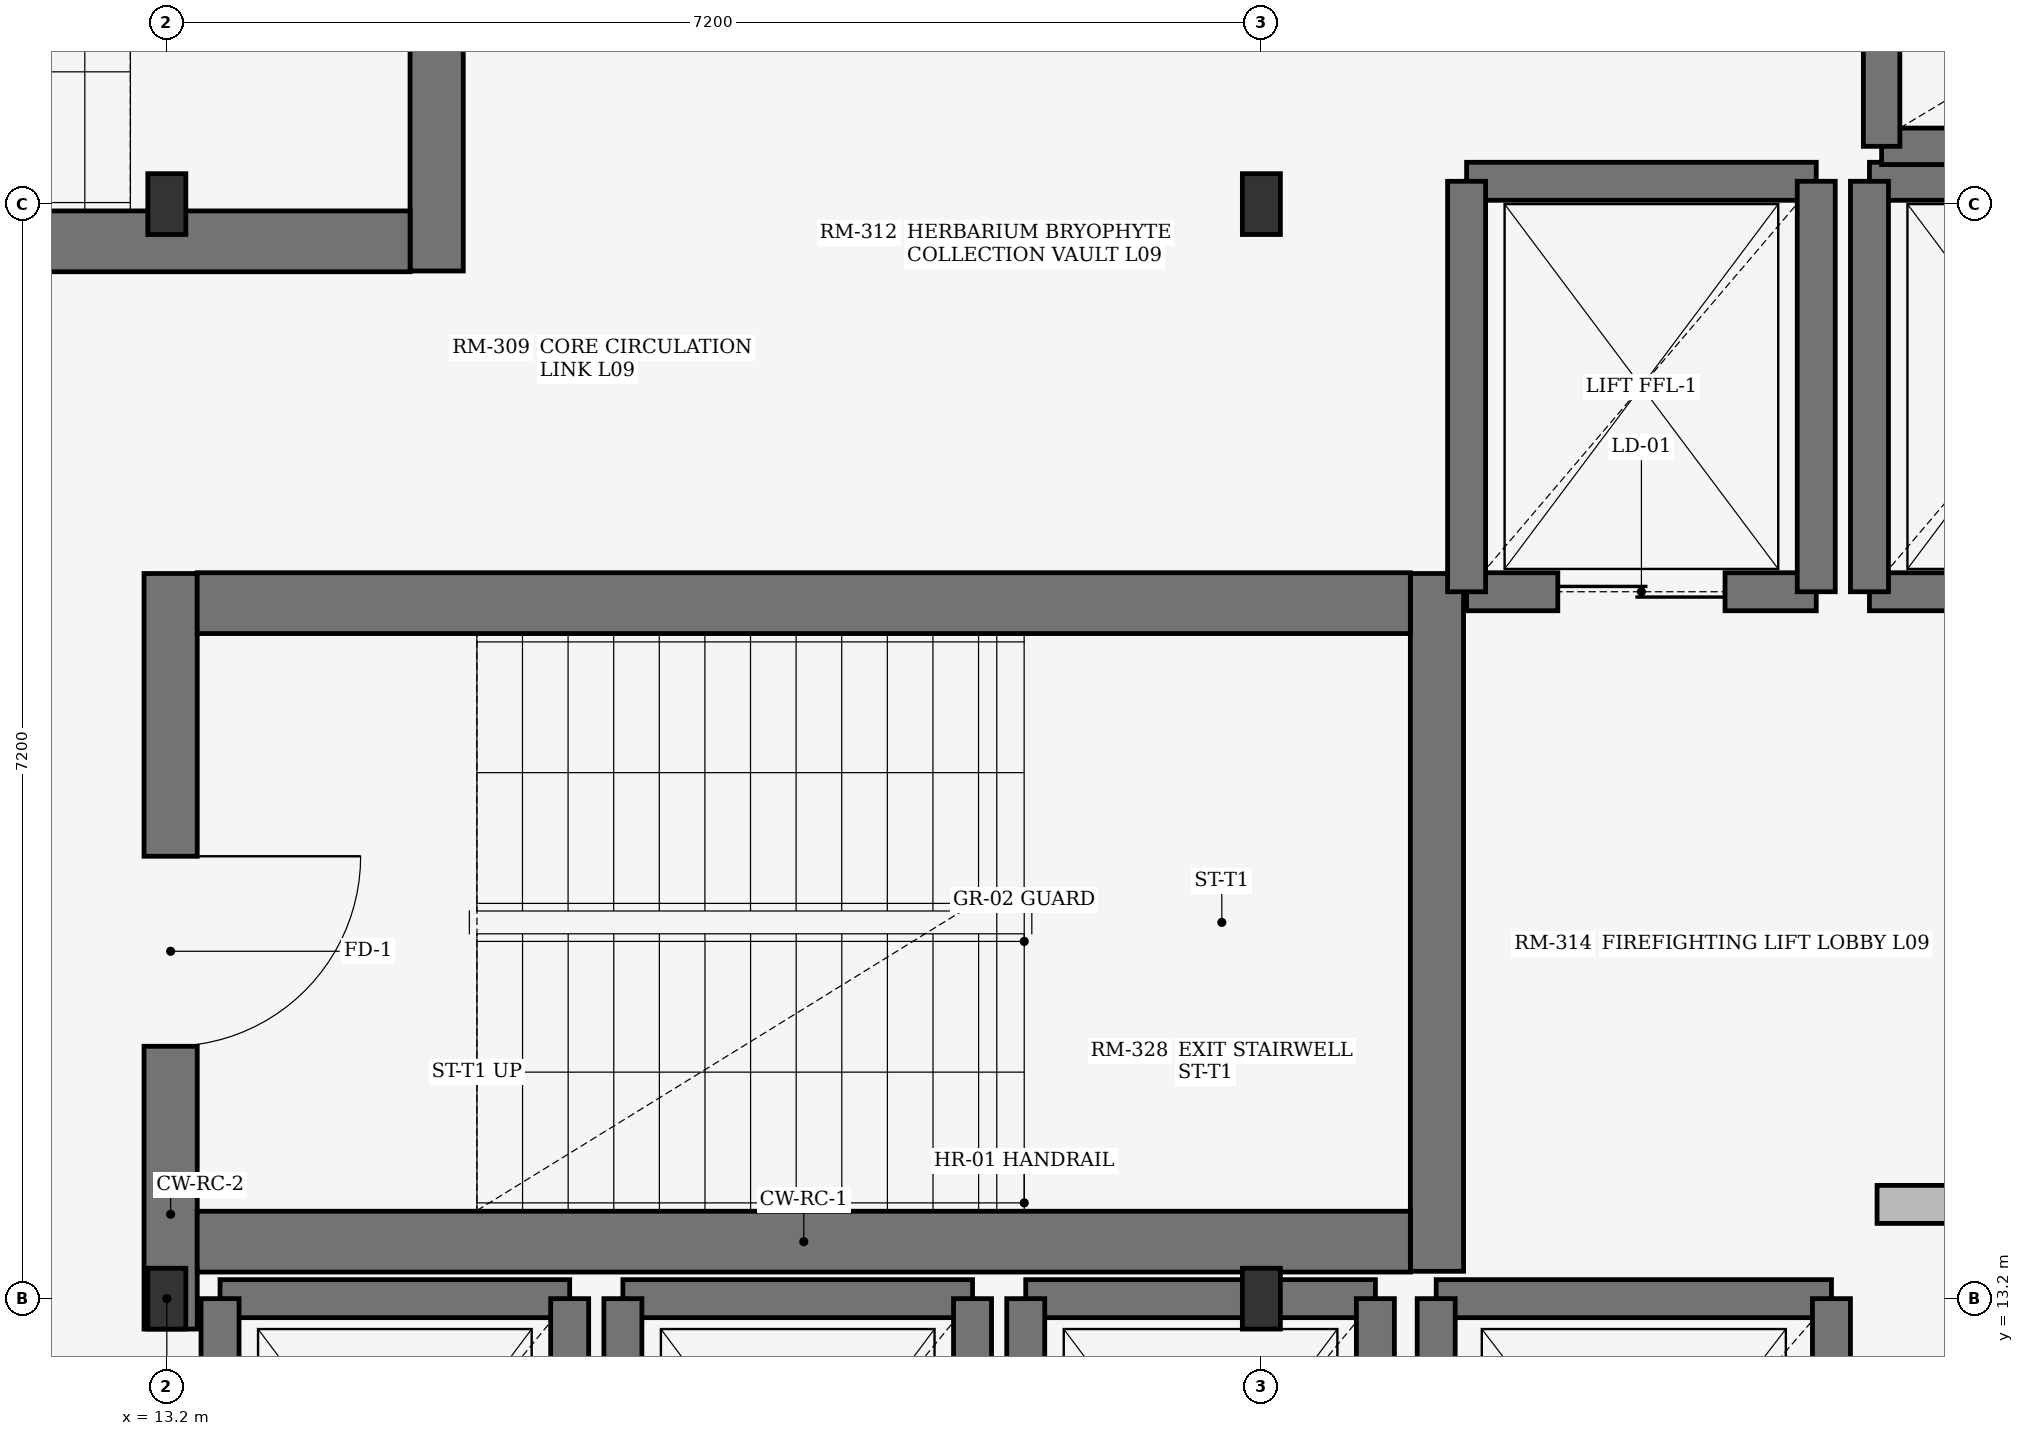
"""IFC4 building model, lengths in metres.
Left out: names, types, materials, properties, quantities, classifications, styles, units other than length and angle.
Written with IfcOpenShell. Run it as: python <this file> out.ifc"""

import sys

from ifc_helpers import new_model, si_unit, direction, frame, frame_2d, origin, origin_2d, place, context, subcontext, project, spatial, rectangle, i_section, extrude, element, fill, save


model = new_model("IFC4")
c1 = context("Model", 3, precision=1e-05, world=origin(), true_north=direction((0.0, 1.0)))
c2 = subcontext(c1, "Body", "Model", "MODEL_VIEW")
j1 = project(units=[si_unit("LENGTHUNIT", "METRE"), si_unit("PLANEANGLEUNIT", "RADIAN")], contexts=[c1])
p1 = place(None, origin())
s1 = spatial("IfcSite", under=j1, at=p1, CompositionType="ELEMENT")
p2 = place(p1, origin())
s2 = spatial("IfcBuilding", under=s1, at=p2, CompositionType="ELEMENT")
p3 = place(p2, frame((0.0, 0.0, 36.6)))
s3 = spatial("IfcBuildingStorey", under=s2, at=p3, CompositionType="ELEMENT", Elevation=36.6)
for number, where, z_axis, x_axis in (
    (1, (13.2, 13.2, 0.0), (0.0, 0.0, 1.0), (1.0, 0.0, 0.0)),
    (2, (13.2, 20.4, 0.0), (0.0, 0.0, 1.0), (1.0, 0.0, 0.0)),
    (3, (20.4, 13.2, 0.0), (0.0, 0.0, 1.0), (1.0, 0.0, 0.0)),
    (4, (20.4, 20.4, 0.0), (0.0, 0.0, 1.0), (1.0, 0.0, 0.0)),
):
    element("IfcColumn", number, at=place(p3, frame(where, z_axis=z_axis, x_axis=x_axis)), inside=s3, PredefinedType="COLUMN", context=c2, shape_type="SweptSolid", body=[
        extrude(i_section(OverallWidth=0.25, OverallDepth=0.4, WebThickness=0.01, FlangeThickness=0.013, at=origin_2d()), origin(), (0.0, 0.0, 1.0), 3.62),
    ])
p4 = place(p3, frame((13.225, 13.0, 0.0), z_axis=(0.0, 0.0, 1.0), x_axis=(0.0, 1.0, 0.0)))
e5 = element("IfcWall", 5, at=p4, inside=s3, PredefinedType="SHEAR", context=c2, shape_type="SweptSolid", body=[
    extrude(rectangle(XDim=4.97, YDim=0.35, at=frame_2d((2.485, 0.0))), origin(), (0.0, 0.0, 1.0), 3.62),
])
p5 = place(p4, frame((1.86, 0.0, 0.0)))
e6 = element("IfcOpeningElement", 6, at=p5, cuts=e5, PredefinedType="OPENING", context=c2, shape_type="SweptSolid", body=[
    extrude(rectangle(XDim=1.25, YDim=2.2, at=frame_2d((0.625, 1.1))), frame((0.0, 0.185, 0.0), z_axis=(0.0, -1.0, 0.0), x_axis=(1.0, 0.0, 0.0)), (0.0, 0.0, 1.0), 0.37),
])
p6 = place(p3, frame((21.555, 13.38, 0.0), z_axis=(0.0, 0.0, 1.0), x_axis=(0.0, 1.0, 0.0)))
e7 = element("IfcWall", 7, at=p6, inside=s3, PredefinedType="SHEAR", context=c2, shape_type="SweptSolid", body=[
    extrude(rectangle(XDim=4.59, YDim=0.35, at=frame_2d((2.295, 0.0))), origin(), (0.0, 0.0, 1.0), 3.62),
])
for number, where, z_axis, x_axis in (
    (8, (13.4, 13.575, 0.0), (0.0, 0.0, 1.0), (1.0, 0.0, 0.0)),
    (9, (13.4, 17.775, 0.0), (0.0, 0.0, 1.0), (1.0, 0.0, 0.0)),
):
    element("IfcWall", number, at=place(p3, frame(where, z_axis=z_axis, x_axis=x_axis)), inside=s3, PredefinedType="SHEAR", context=c2, shape_type="SweptSolid", body=[
        extrude(rectangle(XDim=7.98, YDim=0.4, at=frame_2d((3.99, 0.0))), origin(), (0.0, 0.0, 1.0), 3.62),
    ])
p7 = place(p3, frame((14.975, 24.55, 0.0), z_axis=(0.0, 0.0, 1.0), x_axis=(0.0, -1.0, 0.0)))
e10 = element("IfcWall", 10, at=p7, inside=s3, PredefinedType="SHEAR", context=c2, shape_type="SweptSolid", body=[
    extrude(rectangle(XDim=4.59, YDim=0.35, at=frame_2d((2.295, 0.0))), origin(), (0.0, 0.0, 1.0), 3.62),
])
p8 = place(p7, frame((1.72, 0.0, 0.0)))
e11 = element("IfcOpeningElement", 11, at=p8, cuts=e10, PredefinedType="OPENING", context=c2, shape_type="SweptSolid", body=[
    extrude(rectangle(XDim=1.15, YDim=2.2, at=frame_2d((0.575, 1.1))), frame((0.0, 0.185, 0.0), z_axis=(0.0, -1.0, 0.0), x_axis=(1.0, 0.0, 0.0)), (0.0, 0.0, 1.0), 0.37),
])
p9 = place(p3, frame((14.8, 20.155, 0.0), z_axis=(0.0, 0.0, 1.0), x_axis=(-1.0, 0.0, 0.0)))
e12 = element("IfcWall", 12, at=p9, inside=s3, PredefinedType="SHEAR", context=c2, shape_type="SweptSolid", body=[
    extrude(rectangle(XDim=7.98, YDim=0.4, at=frame_2d((3.99, 0.0))), origin(), (0.0, 0.0, 1.0), 3.62),
])
p10 = place(p3, frame((21.75, 17.85, 0.0), z_axis=(0.0, 0.0, 1.0), x_axis=(1.0, 0.0, 0.0)))
e13 = element("IfcWall", 13, at=p10, inside=s3, PredefinedType="SHEAR", context=c2, shape_type="SweptSolid", body=[
    extrude(rectangle(XDim=2.3, YDim=0.25, at=frame_2d((1.15, 0.0))), origin(), (0.0, 0.0, 1.0), 3.62),
])
p11 = place(p10, frame((0.6, 0.0, 0.0)))
e14 = element("IfcOpeningElement", 14, at=p11, cuts=e13, PredefinedType="OPENING", context=c2, shape_type="SweptSolid", body=[
    extrude(rectangle(XDim=1.1, YDim=2.2, at=frame_2d((0.55, 1.1))), frame((0.0, 0.135, 0.0), z_axis=(0.0, -1.0, 0.0), x_axis=(1.0, 0.0, 0.0)), (0.0, 0.0, 1.0), 0.27),
])
p12 = place(p3, frame((21.75, 20.55, 0.0), z_axis=(0.0, 0.0, 1.0), x_axis=(1.0, 0.0, 0.0)))
e15 = element("IfcWall", 15, at=p12, inside=s3, PredefinedType="SHEAR", context=c2, shape_type="SweptSolid", body=[
    extrude(rectangle(XDim=2.3, YDim=0.25, at=frame_2d((1.15, 0.0))), origin(), (0.0, 0.0, 1.0), 3.62),
])
for number, where, z_axis, x_axis in (
    (16, (21.75, 17.85, 0.0), (0.0, 0.0, 1.0), (0.0, 1.0, 0.0)),
    (17, (24.05, 17.85, 0.0), (0.0, 0.0, 1.0), (0.0, 1.0, 0.0)),
):
    element("IfcWall", number, at=place(p3, frame(where, z_axis=z_axis, x_axis=x_axis)), inside=s3, PredefinedType="SHEAR", context=c2, shape_type="SweptSolid", body=[
        extrude(rectangle(XDim=2.7, YDim=0.25, at=frame_2d((1.35, 0.0))), origin(), (0.0, 0.0, 1.0), 3.62),
    ])
p13 = place(p3, frame((24.4, 17.85, 0.0), z_axis=(0.0, 0.0, 1.0), x_axis=(1.0, 0.0, 0.0)))
e18 = element("IfcWall", 18, at=p13, inside=s3, PredefinedType="SHEAR", context=c2, shape_type="SweptSolid", body=[
    extrude(rectangle(XDim=2.3, YDim=0.25, at=frame_2d((1.15, 0.0))), origin(), (0.0, 0.0, 1.0), 3.62),
])
p14 = place(p13, frame((0.6, 0.0, 0.0)))
e19 = element("IfcOpeningElement", 19, at=p14, cuts=e18, PredefinedType="OPENING", context=c2, shape_type="SweptSolid", body=[
    extrude(rectangle(XDim=1.1, YDim=2.2, at=frame_2d((0.55, 1.1))), frame((0.0, 0.135, 0.0), z_axis=(0.0, -1.0, 0.0), x_axis=(1.0, 0.0, 0.0)), (0.0, 0.0, 1.0), 0.27),
])
p15 = place(p3, frame((24.4, 20.55, 0.0), z_axis=(0.0, 0.0, 1.0), x_axis=(1.0, 0.0, 0.0)))
e20 = element("IfcWall", 20, at=p15, inside=s3, PredefinedType="SHEAR", context=c2, shape_type="SweptSolid", body=[
    extrude(rectangle(XDim=2.3, YDim=0.25, at=frame_2d((1.15, 0.0))), origin(), (0.0, 0.0, 1.0), 3.62),
])
p16 = place(p3, frame((24.4, 17.85, 0.0), z_axis=(0.0, 0.0, 1.0), x_axis=(0.0, 1.0, 0.0)))
e21 = element("IfcWall", 21, at=p16, inside=s3, PredefinedType="SHEAR", context=c2, shape_type="SweptSolid", body=[
    extrude(rectangle(XDim=2.7, YDim=0.25, at=frame_2d((1.35, 0.0))), origin(), (0.0, 0.0, 1.0), 3.62),
])
p17 = place(p3, frame((13.55, 13.2, 0.0), z_axis=(0.0, 0.0, 1.0), x_axis=(1.0, 0.0, 0.0)))
e22 = element("IfcWall", 22, at=p17, inside=s3, PredefinedType="SHEAR", context=c2, shape_type="SweptSolid", body=[
    extrude(rectangle(XDim=2.3, YDim=0.25, at=frame_2d((1.15, 0.0))), origin(), (0.0, 0.0, 1.0), 3.62),
])
for number, where, z_axis, x_axis in (
    (23, (13.55, 10.4, 0.0), (0.0, 0.0, 1.0), (0.0, 1.0, 0.0)),
    (24, (15.85, 10.4, 0.0), (0.0, 0.0, 1.0), (0.0, 1.0, 0.0)),
):
    element("IfcWall", number, at=place(p3, frame(where, z_axis=z_axis, x_axis=x_axis)), inside=s3, PredefinedType="SHEAR", context=c2, shape_type="SweptSolid", body=[
        extrude(rectangle(XDim=2.8, YDim=0.25, at=frame_2d((1.4, 0.0))), origin(), (0.0, 0.0, 1.0), 3.62),
    ])
p18 = place(p3, frame((16.2, 13.2, 0.0), z_axis=(0.0, 0.0, 1.0), x_axis=(1.0, 0.0, 0.0)))
e25 = element("IfcWall", 25, at=p18, inside=s3, PredefinedType="SHEAR", context=c2, shape_type="SweptSolid", body=[
    extrude(rectangle(XDim=2.3, YDim=0.25, at=frame_2d((1.15, 0.0))), origin(), (0.0, 0.0, 1.0), 3.62),
])
for number, where, z_axis, x_axis in (
    (26, (16.2, 10.4, 0.0), (0.0, 0.0, 1.0), (0.0, 1.0, 0.0)),
    (27, (18.5, 10.4, 0.0), (0.0, 0.0, 1.0), (0.0, 1.0, 0.0)),
):
    element("IfcWall", number, at=place(p3, frame(where, z_axis=z_axis, x_axis=x_axis)), inside=s3, PredefinedType="SHEAR", context=c2, shape_type="SweptSolid", body=[
        extrude(rectangle(XDim=2.8, YDim=0.25, at=frame_2d((1.4, 0.0))), origin(), (0.0, 0.0, 1.0), 3.62),
    ])
p19 = place(p3, frame((18.85, 13.2, 0.0), z_axis=(0.0, 0.0, 1.0), x_axis=(1.0, 0.0, 0.0)))
e28 = element("IfcWall", 28, at=p19, inside=s3, PredefinedType="SHEAR", context=c2, shape_type="SweptSolid", body=[
    extrude(rectangle(XDim=2.3, YDim=0.25, at=frame_2d((1.15, 0.0))), origin(), (0.0, 0.0, 1.0), 3.62),
])
for number, where, z_axis, x_axis in (
    (29, (18.85, 10.4, 0.0), (0.0, 0.0, 1.0), (0.0, 1.0, 0.0)),
    (30, (21.15, 10.4, 0.0), (0.0, 0.0, 1.0), (0.0, 1.0, 0.0)),
):
    element("IfcWall", number, at=place(p3, frame(where, z_axis=z_axis, x_axis=x_axis)), inside=s3, PredefinedType="SHEAR", context=c2, shape_type="SweptSolid", body=[
        extrude(rectangle(XDim=2.8, YDim=0.25, at=frame_2d((1.4, 0.0))), origin(), (0.0, 0.0, 1.0), 3.62),
    ])
p20 = place(p3, frame((21.55, 13.2, 0.0), z_axis=(0.0, 0.0, 1.0), x_axis=(1.0, 0.0, 0.0)))
e31 = element("IfcWall", 31, at=p20, inside=s3, PredefinedType="SHEAR", context=c2, shape_type="SweptSolid", body=[
    extrude(rectangle(XDim=2.6, YDim=0.25, at=frame_2d((1.3, 0.0))), origin(), (0.0, 0.0, 1.0), 3.62),
])
for number, where, z_axis, x_axis in (
    (32, (21.55, 10.2, 0.0), (0.0, 0.0, 1.0), (0.0, 1.0, 0.0)),
    (33, (24.15, 10.2, 0.0), (0.0, 0.0, 1.0), (0.0, 1.0, 0.0)),
):
    element("IfcWall", number, at=place(p3, frame(where, z_axis=z_axis, x_axis=x_axis)), inside=s3, PredefinedType="SHEAR", context=c2, shape_type="SweptSolid", body=[
        extrude(rectangle(XDim=3.0, YDim=0.25, at=frame_2d((1.5, 0.0))), origin(), (0.0, 0.0, 1.0), 3.62),
    ])
p21 = place(p3, frame((24.48, 20.78, 0.0), z_axis=(0.0, 0.0, 1.0), x_axis=(1.0, 0.0, 0.0)))
e34 = element("IfcWall", 34, at=p21, inside=s3, PredefinedType="SHEAR", context=c2, shape_type="SweptSolid", body=[
    extrude(rectangle(XDim=2.24, YDim=0.24, at=frame_2d((1.12, 0.0))), origin(), (0.0, 0.0, 1.0), 3.62),
])
p22 = place(p3, frame((24.48, 20.78, 0.0), z_axis=(0.0, 0.0, 1.0), x_axis=(0.0, 1.0, 0.0)))
e35 = element("IfcWall", 35, at=p22, inside=s3, PredefinedType="SHEAR", context=c2, shape_type="SweptSolid", body=[
    extrude(rectangle(XDim=2.94, YDim=0.24, at=frame_2d((1.47, 0.0))), origin(), (0.0, 0.0, 1.0), 3.62),
])
p23 = place(p3, frame((24.45, 13.82, 0.0), z_axis=(0.0, 0.0, 1.0), x_axis=(1.0, 0.0, 0.0)))
e36 = element("IfcWall", 36, at=p23, inside=s3, PredefinedType="SOLIDWALL", context=c2, shape_type="SweptSolid", body=[
    extrude(rectangle(XDim=2.0, YDim=0.25, at=frame_2d((1.0, 0.0))), origin(), (0.0, 0.0, 1.0), 3.6),
])
p24 = place(p5, origin())
e37 = element("IfcDoor", 37, at=p24, inside=s3, OperationType="SINGLE_SWING_RIGHT", PredefinedType="DOOR", context=c2, shape_type="SweptSolid", body=[
    extrude(rectangle(XDim=1.25, YDim=2.2, at=frame_2d((0.625, 1.1))), frame((0.0, 0.025, 0.0), z_axis=(0.0, -1.0, 0.0), x_axis=(1.0, 0.0, 0.0)), (0.0, 0.0, 1.0), 0.05),
])
fill(e6, e37)
p25 = place(p11, origin())
e38 = element("IfcDoor", 38, at=p25, inside=s3, OperationType="DOUBLE_DOOR_SLIDING", PredefinedType="DOOR", context=c2, shape_type="SweptSolid", body=[
    extrude(rectangle(XDim=1.1, YDim=2.2, at=frame_2d((0.55, 1.1))), frame((0.0, 0.025, 0.0), z_axis=(0.0, -1.0, 0.0), x_axis=(1.0, 0.0, 0.0)), (0.0, 0.0, 1.0), 0.05),
])
fill(e14, e38)
save(model, sys.argv[1])
